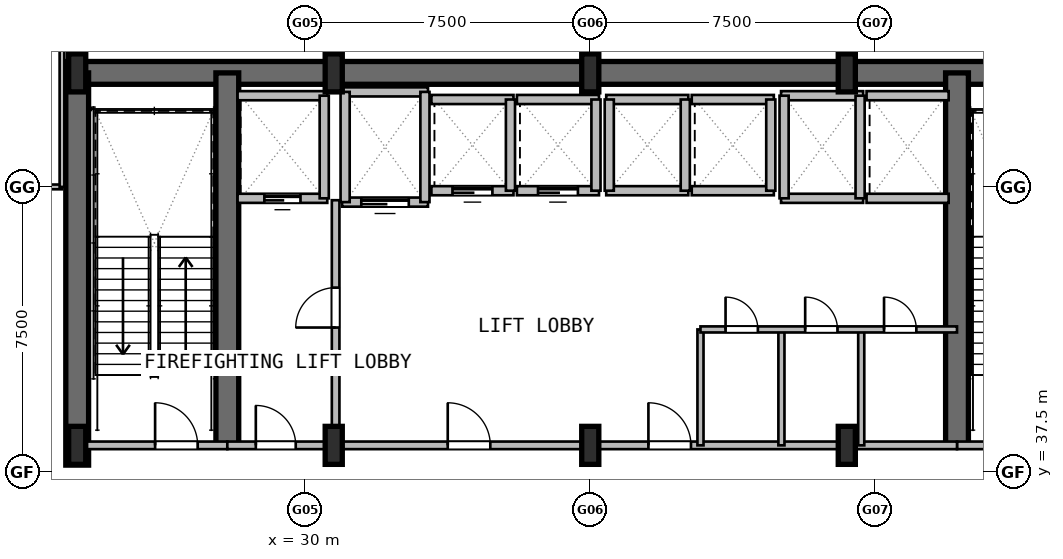
"""IFC4 building model, lengths in metres.
Left out: names, types, materials, properties, quantities, classifications, styles, units other than length and angle.
Written with IfcOpenShell. Run it as: python <this file> out.ifc"""

import sys

from ifc_helpers import new_model, si_unit, direction, frame, frame_2d, origin, origin_2d, place, context, subcontext, project, spatial, rectangle, i_section, extrude, element, fill, save


model = new_model("IFC4")
c1 = context("Model", 3, precision=1e-05, world=origin(), true_north=direction((0.0, 1.0)))
c2 = subcontext(c1, "Body", "Model", "MODEL_VIEW")
j1 = project(units=[si_unit("LENGTHUNIT", "METRE"), si_unit("PLANEANGLEUNIT", "RADIAN")], contexts=[c1])
p1 = place(None, origin())
s1 = spatial("IfcSite", under=j1, at=p1, CompositionType="ELEMENT")
p2 = place(p1, origin())
s2 = spatial("IfcBuilding", under=s1, at=p2, CompositionType="ELEMENT")
p3 = place(p2, frame((0.0, 0.0, 15.6)))
s3 = spatial("IfcBuildingStorey", under=s2, at=p3, CompositionType="ELEMENT", Elevation=15.6)
p4 = place(p3, frame((23.7, 48.0, 0.0), z_axis=(0.0, 0.0, 1.0), x_axis=(1.0, 0.0, 0.0)))
e1 = element("IfcWall", 1, at=p4, inside=s3, PredefinedType="SHEAR", context=c2, shape_type="SweptSolid", body=[
    extrude(rectangle(XDim=27.6, YDim=0.6, at=frame_2d((13.8, 0.0))), origin(), (0.0, 0.0, 1.0), 4.8),
])
p5 = place(p3, frame((24.0, 37.68, 0.0), z_axis=(0.0, 0.0, 1.0), x_axis=(0.0, 1.0, 0.0)))
e2 = element("IfcWall", 2, at=p5, inside=s3, PredefinedType="SHEAR", context=c2, shape_type="SweptSolid", body=[
    extrude(rectangle(XDim=10.32, YDim=0.6, at=frame_2d((5.16, 0.0))), origin(), (0.0, 0.0, 1.0), 4.8),
])
for number, where, z_axis, x_axis in (
    (3, (27.95, 38.2, 0.0), (0.0, 0.0, 1.0), (0.0, 1.0, 0.0)),
    (4, (47.15, 38.2, 0.0), (0.0, 0.0, 1.0), (0.0, 1.0, 0.0)),
):
    element("IfcWall", number, at=place(p3, frame(where, z_axis=z_axis, x_axis=x_axis)), inside=s3, PredefinedType="SHEAR", context=c2, shape_type="SweptSolid", body=[
        extrude(rectangle(XDim=9.8, YDim=0.6, at=frame_2d((4.9, 0.0))), origin(), (0.0, 0.0, 1.0), 4.8),
    ])
for number, where, z_axis, x_axis in (
    (5, (24.0, 38.2, 0.0), (0.0, 0.0, 1.0), (1.0, 0.0, 0.0)),
    (6, (24.0, 48.0, 0.0), (0.0, 0.0, 1.0), (1.0, 0.0, 0.0)),
    (7, (30.75, 38.2, 0.0), (0.0, 0.0, 1.0), (1.0, 0.0, 0.0)),
    (8, (30.75, 48.0, 0.0), (0.0, 0.0, 1.0), (1.0, 0.0, 0.0)),
    (9, (37.5, 38.2, 0.0), (0.0, 0.0, 1.0), (1.0, 0.0, 0.0)),
    (10, (37.5, 48.0, 0.0), (0.0, 0.0, 1.0), (1.0, 0.0, 0.0)),
    (11, (44.25, 38.2, 0.0), (0.0, 0.0, 1.0), (1.0, 0.0, 0.0)),
    (12, (44.25, 48.0, 0.0), (0.0, 0.0, 1.0), (1.0, 0.0, 0.0)),
):
    element("IfcColumn", number, at=place(p3, frame(where, z_axis=z_axis, x_axis=x_axis)), inside=s3, PredefinedType="COLUMN", context=c2, shape_type="SweptSolid", body=[
        extrude(i_section(OverallWidth=0.45, OverallDepth=1.0, WebThickness=0.022, FlangeThickness=0.04, at=origin_2d()), origin(), (0.0, 0.0, 1.0), 4.8),
    ])
p6 = place(p3, frame((24.0, 38.2, 0.0), z_axis=(0.0, 0.0, 1.0), x_axis=(1.0, 0.0, 0.0)))
e13 = element("IfcWall", 13, at=p6, inside=s3, PredefinedType="PARTITIONING", context=c2, shape_type="SweptSolid", body=[
    extrude(rectangle(XDim=3.95, YDim=0.2, at=frame_2d((1.975, 0.0))), origin(), (0.0, 0.0, 1.0), 3.68),
])
p7 = place(p6, frame((2.05, 0.0, 0.0)))
e14 = element("IfcOpeningElement", 14, at=p7, cuts=e13, PredefinedType="OPENING", context=c2, shape_type="SweptSolid", body=[
    extrude(rectangle(XDim=1.12, YDim=2.1, at=frame_2d((0.56, 1.05))), frame((0.0, 0.11, 0.0), z_axis=(0.0, -1.0, 0.0), x_axis=(1.0, 0.0, 0.0)), (0.0, 0.0, 1.0), 0.22),
])
p8 = place(p3, frame((47.15, 38.2, 0.0), z_axis=(0.0, 0.0, 1.0), x_axis=(1.0, 0.0, 0.0)))
e15 = element("IfcWall", 15, at=p8, inside=s3, PredefinedType="PARTITIONING", context=c2, shape_type="SweptSolid", body=[
    extrude(rectangle(XDim=3.85, YDim=0.2, at=frame_2d((1.925, 0.0))), origin(), (0.0, 0.0, 1.0), 3.68),
])
p9 = place(p8, frame((0.75, 0.0, 0.0)))
e16 = element("IfcOpeningElement", 16, at=p9, cuts=e15, PredefinedType="OPENING", context=c2, shape_type="SweptSolid", body=[
    extrude(rectangle(XDim=1.12, YDim=2.1, at=frame_2d((0.56, 1.05))), frame((0.0, 0.11, 0.0), z_axis=(0.0, -1.0, 0.0), x_axis=(1.0, 0.0, 0.0)), (0.0, 0.0, 1.0), 0.22),
])
p10 = place(p3, frame((30.8, 38.2, 0.0), z_axis=(0.0, 0.0, 1.0), x_axis=(0.0, 1.0, 0.0)))
e17 = element("IfcWall", 17, at=p10, inside=s3, PredefinedType="PARTITIONING", context=c2, shape_type="SweptSolid", body=[
    extrude(rectangle(XDim=6.45, YDim=0.2, at=frame_2d((3.225, 0.0))), origin(), (0.0, 0.0, 1.0), 3.68),
])
p11 = place(p10, frame((3.1, 0.0, 0.0)))
e18 = element("IfcOpeningElement", 18, at=p11, cuts=e17, PredefinedType="OPENING", context=c2, shape_type="SweptSolid", body=[
    extrude(rectangle(XDim=1.05, YDim=2.1, at=frame_2d((0.525, 1.05))), frame((0.0, 0.11, 0.0), z_axis=(0.0, -1.0, 0.0), x_axis=(1.0, 0.0, 0.0)), (0.0, 0.0, 1.0), 0.22),
])
p12 = place(p3, frame((27.95, 38.2, 0.0), z_axis=(0.0, 0.0, 1.0), x_axis=(1.0, 0.0, 0.0)))
e19 = element("IfcWall", 19, at=p12, inside=s3, PredefinedType="PARTITIONING", context=c2, shape_type="SweptSolid", body=[
    extrude(rectangle(XDim=2.85, YDim=0.2, at=frame_2d((1.425, 0.0))), origin(), (0.0, 0.0, 1.0), 3.68),
])
p13 = place(p12, frame((0.75, 0.0, 0.0)))
e20 = element("IfcOpeningElement", 20, at=p13, cuts=e19, PredefinedType="OPENING", context=c2, shape_type="SweptSolid", body=[
    extrude(rectangle(XDim=1.05, YDim=2.1, at=frame_2d((0.525, 1.05))), frame((0.0, 0.11, 0.0), z_axis=(0.0, -1.0, 0.0), x_axis=(1.0, 0.0, 0.0)), (0.0, 0.0, 1.0), 0.22),
])
p14 = place(p3, frame((30.8, 38.2, 0.0), z_axis=(0.0, 0.0, 1.0), x_axis=(1.0, 0.0, 0.0)))
e21 = element("IfcWall", 21, at=p14, inside=s3, PredefinedType="PARTITIONING", context=c2, shape_type="SweptSolid", body=[
    extrude(rectangle(XDim=16.35, YDim=0.2, at=frame_2d((8.175, 0.0))), origin(), (0.0, 0.0, 1.0), 3.68),
])
p15 = place(p14, frame((2.95, 0.0, 0.0)))
e22 = element("IfcOpeningElement", 22, at=p15, cuts=e21, PredefinedType="OPENING", context=c2, shape_type="SweptSolid", body=[
    extrude(rectangle(XDim=1.12, YDim=2.1, at=frame_2d((0.56, 1.05))), frame((0.0, 0.11, 0.0), z_axis=(0.0, -1.0, 0.0), x_axis=(1.0, 0.0, 0.0)), (0.0, 0.0, 1.0), 0.22),
])
p16 = place(p14, frame((8.23, 0.0, 0.0)))
e23 = element("IfcOpeningElement", 23, at=p16, cuts=e21, PredefinedType="OPENING", context=c2, shape_type="SweptSolid", body=[
    extrude(rectangle(XDim=1.12, YDim=2.1, at=frame_2d((0.56, 1.05))), frame((0.0, 0.11, 0.0), z_axis=(0.0, -1.0, 0.0), x_axis=(1.0, 0.0, 0.0)), (0.0, 0.0, 1.0), 0.22),
])
p17 = place(p3, frame((28.22, 44.7, 0.0), z_axis=(0.0, 0.0, 1.0), x_axis=(1.0, 0.0, 0.0)))
e24 = element("IfcWall", 24, at=p17, inside=s3, PredefinedType="PARTITIONING", context=c2, shape_type="SweptSolid", body=[
    extrude(rectangle(XDim=2.36, YDim=0.24, at=frame_2d((1.18, 0.0))), origin(), (0.0, 0.0, 1.0), 4.48),
])
p18 = place(p17, frame((0.705, 0.0, 0.0)))
e25 = element("IfcOpeningElement", 25, at=p18, cuts=e24, PredefinedType="OPENING", context=c2, shape_type="SweptSolid", body=[
    extrude(rectangle(XDim=0.95, YDim=2.15, at=frame_2d((0.475, 1.075))), frame((0.0, 0.13, 0.0), z_axis=(0.0, -1.0, 0.0), x_axis=(1.0, 0.0, 0.0)), (0.0, 0.0, 1.0), 0.26),
])
p19 = place(p3, frame((28.22, 47.4, 0.0), z_axis=(0.0, 0.0, 1.0), x_axis=(1.0, 0.0, 0.0)))
e26 = element("IfcWall", 26, at=p19, inside=s3, PredefinedType="PARTITIONING", context=c2, shape_type="SweptSolid", body=[
    extrude(rectangle(XDim=2.36, YDim=0.24, at=frame_2d((1.18, 0.0))), origin(), (0.0, 0.0, 1.0), 4.48),
])
p20 = place(p3, frame((30.5, 44.7, 0.0), z_axis=(0.0, 0.0, 1.0), x_axis=(0.0, 1.0, 0.0)))
e27 = element("IfcWall", 27, at=p20, inside=s3, PredefinedType="PARTITIONING", context=c2, shape_type="SweptSolid", body=[
    extrude(rectangle(XDim=2.7, YDim=0.24, at=frame_2d((1.35, 0.0))), origin(), (0.0, 0.0, 1.0), 3.68),
])
p21 = place(p3, frame((30.97, 44.6, 0.0), z_axis=(0.0, 0.0, 1.0), x_axis=(1.0, 0.0, 0.0)))
e28 = element("IfcWall", 28, at=p21, inside=s3, PredefinedType="PARTITIONING", context=c2, shape_type="SweptSolid", body=[
    extrude(rectangle(XDim=2.26, YDim=0.24, at=frame_2d((1.13, 0.0))), origin(), (0.0, 0.0, 1.0), 4.48),
])
p22 = place(p21, frame((0.505, 0.0, 0.0)))
e29 = element("IfcOpeningElement", 29, at=p22, cuts=e28, PredefinedType="OPENING", context=c2, shape_type="SweptSolid", body=[
    extrude(rectangle(XDim=1.25, YDim=2.2, at=frame_2d((0.625, 1.1))), frame((0.0, 0.13, 0.0), z_axis=(0.0, -1.0, 0.0), x_axis=(1.0, 0.0, 0.0)), (0.0, 0.0, 1.0), 0.26),
])
p23 = place(p3, frame((30.97, 47.5, 0.0), z_axis=(0.0, 0.0, 1.0), x_axis=(1.0, 0.0, 0.0)))
e30 = element("IfcWall", 30, at=p23, inside=s3, PredefinedType="PARTITIONING", context=c2, shape_type="SweptSolid", body=[
    extrude(rectangle(XDim=2.26, YDim=0.24, at=frame_2d((1.13, 0.0))), origin(), (0.0, 0.0, 1.0), 4.48),
])
p24 = place(p3, frame((31.05, 44.6, 0.0), z_axis=(0.0, 0.0, 1.0), x_axis=(0.0, 1.0, 0.0)))
e31 = element("IfcWall", 31, at=p24, inside=s3, PredefinedType="PARTITIONING", context=c2, shape_type="SweptSolid", body=[
    extrude(rectangle(XDim=2.9, YDim=0.24, at=frame_2d((1.45, 0.0))), origin(), (0.0, 0.0, 1.0), 3.68),
])
p25 = place(p3, frame((33.15, 44.6, 0.0), z_axis=(0.0, 0.0, 1.0), x_axis=(0.0, 1.0, 0.0)))
e32 = element("IfcWall", 32, at=p25, inside=s3, PredefinedType="PARTITIONING", context=c2, shape_type="SweptSolid", body=[
    extrude(rectangle(XDim=2.9, YDim=0.24, at=frame_2d((1.45, 0.0))), origin(), (0.0, 0.0, 1.0), 4.48),
])
p26 = place(p3, frame((33.32, 44.9, 0.0), z_axis=(0.0, 0.0, 1.0), x_axis=(1.0, 0.0, 0.0)))
e33 = element("IfcWall", 33, at=p26, inside=s3, PredefinedType="PARTITIONING", context=c2, shape_type="SweptSolid", body=[
    extrude(rectangle(XDim=2.16, YDim=0.24, at=frame_2d((1.08, 0.0))), origin(), (0.0, 0.0, 1.0), 4.48),
])
p27 = place(p26, frame((0.555, 0.0, 0.0)))
e34 = element("IfcOpeningElement", 34, at=p27, cuts=e33, PredefinedType="OPENING", context=c2, shape_type="SweptSolid", body=[
    extrude(rectangle(XDim=1.05, YDim=2.15, at=frame_2d((0.525, 1.075))), frame((0.0, 0.13, 0.0), z_axis=(0.0, -1.0, 0.0), x_axis=(1.0, 0.0, 0.0)), (0.0, 0.0, 1.0), 0.26),
])
p28 = place(p3, frame((33.32, 47.3, 0.0), z_axis=(0.0, 0.0, 1.0), x_axis=(1.0, 0.0, 0.0)))
e35 = element("IfcWall", 35, at=p28, inside=s3, PredefinedType="PARTITIONING", context=c2, shape_type="SweptSolid", body=[
    extrude(rectangle(XDim=2.16, YDim=0.24, at=frame_2d((1.08, 0.0))), origin(), (0.0, 0.0, 1.0), 4.48),
])
p29 = place(p3, frame((35.4, 44.9, 0.0), z_axis=(0.0, 0.0, 1.0), x_axis=(0.0, 1.0, 0.0)))
e36 = element("IfcWall", 36, at=p29, inside=s3, PredefinedType="PARTITIONING", context=c2, shape_type="SweptSolid", body=[
    extrude(rectangle(XDim=2.4, YDim=0.24, at=frame_2d((1.2, 0.0))), origin(), (0.0, 0.0, 1.0), 4.48),
])
p30 = place(p3, frame((35.57, 44.9, 0.0), z_axis=(0.0, 0.0, 1.0), x_axis=(1.0, 0.0, 0.0)))
e37 = element("IfcWall", 37, at=p30, inside=s3, PredefinedType="PARTITIONING", context=c2, shape_type="SweptSolid", body=[
    extrude(rectangle(XDim=2.16, YDim=0.24, at=frame_2d((1.08, 0.0))), origin(), (0.0, 0.0, 1.0), 4.48),
])
p31 = place(p30, frame((0.555, 0.0, 0.0)))
e38 = element("IfcOpeningElement", 38, at=p31, cuts=e37, PredefinedType="OPENING", context=c2, shape_type="SweptSolid", body=[
    extrude(rectangle(XDim=1.05, YDim=2.15, at=frame_2d((0.525, 1.075))), frame((0.0, 0.13, 0.0), z_axis=(0.0, -1.0, 0.0), x_axis=(1.0, 0.0, 0.0)), (0.0, 0.0, 1.0), 0.26),
])
p32 = place(p3, frame((35.57, 47.3, 0.0), z_axis=(0.0, 0.0, 1.0), x_axis=(1.0, 0.0, 0.0)))
e39 = element("IfcWall", 39, at=p32, inside=s3, PredefinedType="PARTITIONING", context=c2, shape_type="SweptSolid", body=[
    extrude(rectangle(XDim=2.16, YDim=0.24, at=frame_2d((1.08, 0.0))), origin(), (0.0, 0.0, 1.0), 4.48),
])
p33 = place(p3, frame((37.65, 44.9, 0.0), z_axis=(0.0, 0.0, 1.0), x_axis=(0.0, 1.0, 0.0)))
e40 = element("IfcWall", 40, at=p33, inside=s3, PredefinedType="PARTITIONING", context=c2, shape_type="SweptSolid", body=[
    extrude(rectangle(XDim=2.4, YDim=0.24, at=frame_2d((1.2, 0.0))), origin(), (0.0, 0.0, 1.0), 4.48),
])
for number, where, z_axis, x_axis in (
    (41, (37.92, 44.9, 0.0), (0.0, 0.0, 1.0), (1.0, 0.0, 0.0)),
    (42, (37.92, 47.3, 0.0), (0.0, 0.0, 1.0), (1.0, 0.0, 0.0)),
):
    element("IfcWall", number, at=place(p3, frame(where, z_axis=z_axis, x_axis=x_axis)), inside=s3, PredefinedType="PARTITIONING", context=c2, shape_type="SweptSolid", body=[
        extrude(rectangle(XDim=2.16, YDim=0.24, at=frame_2d((1.08, 0.0))), origin(), (0.0, 0.0, 1.0), 4.48),
    ])
for number, where, z_axis, x_axis in (
    (43, (38.0, 44.9, 0.0), (0.0, 0.0, 1.0), (0.0, 1.0, 0.0)),
    (44, (40.0, 44.9, 0.0), (0.0, 0.0, 1.0), (0.0, 1.0, 0.0)),
):
    element("IfcWall", number, at=place(p3, frame(where, z_axis=z_axis, x_axis=x_axis)), inside=s3, PredefinedType="PARTITIONING", context=c2, shape_type="SweptSolid", body=[
        extrude(rectangle(XDim=2.4, YDim=0.24, at=frame_2d((1.2, 0.0))), origin(), (0.0, 0.0, 1.0), 4.48),
    ])
for number, where, z_axis, x_axis in (
    (45, (40.17, 44.9, 0.0), (0.0, 0.0, 1.0), (1.0, 0.0, 0.0)),
    (46, (40.17, 47.3, 0.0), (0.0, 0.0, 1.0), (1.0, 0.0, 0.0)),
):
    element("IfcWall", number, at=place(p3, frame(where, z_axis=z_axis, x_axis=x_axis)), inside=s3, PredefinedType="PARTITIONING", context=c2, shape_type="SweptSolid", body=[
        extrude(rectangle(XDim=2.16, YDim=0.24, at=frame_2d((1.08, 0.0))), origin(), (0.0, 0.0, 1.0), 4.48),
    ])
p34 = place(p3, frame((42.25, 44.9, 0.0), z_axis=(0.0, 0.0, 1.0), x_axis=(0.0, 1.0, 0.0)))
e47 = element("IfcWall", 47, at=p34, inside=s3, PredefinedType="PARTITIONING", context=c2, shape_type="SweptSolid", body=[
    extrude(rectangle(XDim=2.4, YDim=0.24, at=frame_2d((1.2, 0.0))), origin(), (0.0, 0.0, 1.0), 4.48),
])
for number, where, z_axis, x_axis in (
    (48, (42.52, 44.7, 0.0), (0.0, 0.0, 1.0), (1.0, 0.0, 0.0)),
    (49, (42.52, 47.4, 0.0), (0.0, 0.0, 1.0), (1.0, 0.0, 0.0)),
):
    element("IfcWall", number, at=place(p3, frame(where, z_axis=z_axis, x_axis=x_axis)), inside=s3, PredefinedType="PARTITIONING", context=c2, shape_type="SweptSolid", body=[
        extrude(rectangle(XDim=2.16, YDim=0.24, at=frame_2d((1.08, 0.0))), origin(), (0.0, 0.0, 1.0), 4.48),
    ])
for number, where, z_axis, x_axis in (
    (50, (42.6, 44.7, 0.0), (0.0, 0.0, 1.0), (0.0, 1.0, 0.0)),
    (51, (44.6, 44.7, 0.0), (0.0, 0.0, 1.0), (0.0, 1.0, 0.0)),
):
    element("IfcWall", number, at=place(p3, frame(where, z_axis=z_axis, x_axis=x_axis)), inside=s3, PredefinedType="PARTITIONING", context=c2, shape_type="SweptSolid", body=[
        extrude(rectangle(XDim=2.7, YDim=0.24, at=frame_2d((1.35, 0.0))), origin(), (0.0, 0.0, 1.0), 4.48),
    ])
for number, where, z_axis, x_axis in (
    (52, (44.77, 44.7, 0.0), (0.0, 0.0, 1.0), (1.0, 0.0, 0.0)),
    (53, (44.77, 47.4, 0.0), (0.0, 0.0, 1.0), (1.0, 0.0, 0.0)),
):
    element("IfcWall", number, at=place(p3, frame(where, z_axis=z_axis, x_axis=x_axis)), inside=s3, PredefinedType="PARTITIONING", context=c2, shape_type="SweptSolid", body=[
        extrude(rectangle(XDim=2.16, YDim=0.24, at=frame_2d((1.08, 0.0))), origin(), (0.0, 0.0, 1.0), 4.48),
    ])
p35 = place(p3, frame((19.0, 45.0, 0.0), z_axis=(0.0, 0.0, 1.0), x_axis=(1.0, 0.0, 0.0)))
e54 = element("IfcWall", 54, at=p35, inside=s3, PredefinedType="PARTITIONING", context=c2, shape_type="SweptSolid", body=[
    extrude(rectangle(XDim=4.6, YDim=0.125, at=frame_2d((2.3, 0.0))), origin(), (0.0, 0.0, 1.0), 4.48),
])
p36 = place(p35, frame((1.5, 0.0, 0.0)))
e55 = element("IfcOpeningElement", 55, at=p36, cuts=e54, PredefinedType="OPENING", context=c2, shape_type="SweptSolid", body=[
    extrude(rectangle(XDim=0.9, YDim=2.05, at=frame_2d((0.45, 1.025))), frame((0.0, 0.073, 0.0), z_axis=(0.0, -1.0, 0.0), x_axis=(1.0, 0.0, 0.0)), (0.0, 0.0, 1.0), 0.145),
])
p37 = place(p3, frame((23.6, 45.0, 0.0), z_axis=(0.0, 0.0, 1.0), x_axis=(0.0, 1.0, 0.0)))
e56 = element("IfcWall", 56, at=p37, inside=s3, PredefinedType="PARTITIONING", context=c2, shape_type="SweptSolid", body=[
    extrude(rectangle(XDim=4.6, YDim=0.125, at=frame_2d((2.3, 0.0))), origin(), (0.0, 0.0, 1.0), 4.48),
])
for number, where, z_axis, x_axis in (
    (57, (40.4, 38.2, 0.0), (0.0, 0.0, 1.0), (0.0, 1.0, 0.0)),
    (58, (42.53, 38.2, 0.0), (0.0, 0.0, 1.0), (0.0, 1.0, 0.0)),
    (59, (44.63, 38.2, 0.0), (0.0, 0.0, 1.0), (0.0, 1.0, 0.0)),
):
    element("IfcWall", number, at=place(p3, frame(where, z_axis=z_axis, x_axis=x_axis)), inside=s3, PredefinedType="PARTITIONING", context=c2, shape_type="SweptSolid", body=[
        extrude(rectangle(XDim=3.05, YDim=0.16, at=frame_2d((1.525, 0.0))), origin(), (0.0, 0.0, 1.0), 4.48),
    ])
p38 = place(p3, frame((40.4, 41.25, 0.0), z_axis=(0.0, 0.0, 1.0), x_axis=(1.0, 0.0, 0.0)))
e60 = element("IfcWall", 60, at=p38, inside=s3, PredefinedType="PARTITIONING", context=c2, shape_type="SweptSolid", body=[
    extrude(rectangle(XDim=6.75, YDim=0.16, at=frame_2d((3.375, 0.0))), origin(), (0.0, 0.0, 1.0), 4.48),
])
p39 = place(p38, frame((0.66, 0.0, 0.0)))
e61 = element("IfcOpeningElement", 61, at=p39, cuts=e60, PredefinedType="OPENING", context=c2, shape_type="SweptSolid", body=[
    extrude(rectangle(XDim=0.85, YDim=2.05, at=frame_2d((0.425, 1.025))), frame((0.0, 0.09, 0.0), z_axis=(0.0, -1.0, 0.0), x_axis=(1.0, 0.0, 0.0)), (0.0, 0.0, 1.0), 0.18),
])
p40 = place(p38, frame((2.755, 0.0, 0.0)))
e62 = element("IfcOpeningElement", 62, at=p40, cuts=e60, PredefinedType="OPENING", context=c2, shape_type="SweptSolid", body=[
    extrude(rectangle(XDim=0.85, YDim=2.05, at=frame_2d((0.425, 1.025))), frame((0.0, 0.09, 0.0), z_axis=(0.0, -1.0, 0.0), x_axis=(1.0, 0.0, 0.0)), (0.0, 0.0, 1.0), 0.18),
])
p41 = place(p38, frame((4.83, 0.0, 0.0)))
e63 = element("IfcOpeningElement", 63, at=p41, cuts=e60, PredefinedType="OPENING", context=c2, shape_type="SweptSolid", body=[
    extrude(rectangle(XDim=0.85, YDim=2.05, at=frame_2d((0.425, 1.025))), frame((0.0, 0.09, 0.0), z_axis=(0.0, -1.0, 0.0), x_axis=(1.0, 0.0, 0.0)), (0.0, 0.0, 1.0), 0.18),
])
p42 = place(p7, origin())
e64 = element("IfcDoor", 64, at=p42, inside=s3, OperationType="SINGLE_SWING_LEFT", PredefinedType="DOOR", context=c2, shape_type="SweptSolid", body=[
    extrude(rectangle(XDim=1.12, YDim=2.1, at=frame_2d((0.56, 1.05))), frame((0.0, 0.025, 0.0), z_axis=(0.0, -1.0, 0.0), x_axis=(1.0, 0.0, 0.0)), (0.0, 0.0, 1.0), 0.05),
])
fill(e14, e64)
p43 = place(p11, origin())
e65 = element("IfcDoor", 65, at=p43, inside=s3, OperationType="SINGLE_SWING_LEFT", PredefinedType="DOOR", context=c2, shape_type="SweptSolid", body=[
    extrude(rectangle(XDim=1.05, YDim=2.1, at=frame_2d((0.525, 1.05))), frame((0.0, 0.025, 0.0), z_axis=(0.0, -1.0, 0.0), x_axis=(1.0, 0.0, 0.0)), (0.0, 0.0, 1.0), 0.05),
])
fill(e18, e65)
p44 = place(p13, origin())
e66 = element("IfcDoor", 66, at=p44, inside=s3, OperationType="SINGLE_SWING_RIGHT", PredefinedType="DOOR", context=c2, shape_type="SweptSolid", body=[
    extrude(rectangle(XDim=1.05, YDim=2.1, at=frame_2d((0.525, 1.05))), frame((0.0, 0.025, 0.0), z_axis=(0.0, -1.0, 0.0), x_axis=(1.0, 0.0, 0.0)), (0.0, 0.0, 1.0), 0.05),
])
fill(e20, e66)
p45 = place(p15, origin())
e67 = element("IfcDoor", 67, at=p45, inside=s3, OperationType="SINGLE_SWING_LEFT", PredefinedType="DOOR", context=c2, shape_type="SweptSolid", body=[
    extrude(rectangle(XDim=1.12, YDim=2.1, at=frame_2d((0.56, 1.05))), frame((0.0, 0.025, 0.0), z_axis=(0.0, -1.0, 0.0), x_axis=(1.0, 0.0, 0.0)), (0.0, 0.0, 1.0), 0.05),
])
fill(e22, e67)
p46 = place(p16, origin())
e68 = element("IfcDoor", 68, at=p46, inside=s3, OperationType="SINGLE_SWING_RIGHT", PredefinedType="DOOR", context=c2, shape_type="SweptSolid", body=[
    extrude(rectangle(XDim=1.12, YDim=2.1, at=frame_2d((0.56, 1.05))), frame((0.0, 0.025, 0.0), z_axis=(0.0, -1.0, 0.0), x_axis=(1.0, 0.0, 0.0)), (0.0, 0.0, 1.0), 0.05),
])
fill(e23, e68)
p47 = place(p18, origin())
e69 = element("IfcDoor", 69, at=p47, inside=s3, OperationType="SLIDING_TO_LEFT", PredefinedType="DOOR", context=c2, shape_type="SweptSolid", body=[
    extrude(rectangle(XDim=0.95, YDim=2.15, at=frame_2d((0.475, 1.075))), frame((0.0, 0.025, 0.0), z_axis=(0.0, -1.0, 0.0), x_axis=(1.0, 0.0, 0.0)), (0.0, 0.0, 1.0), 0.05),
])
fill(e25, e69)
p48 = place(p22, origin())
e70 = element("IfcDoor", 70, at=p48, inside=s3, OperationType="SLIDING_TO_LEFT", PredefinedType="DOOR", context=c2, shape_type="SweptSolid", body=[
    extrude(rectangle(XDim=1.25, YDim=2.2, at=frame_2d((0.625, 1.1))), frame((0.0, 0.025, 0.0), z_axis=(0.0, -1.0, 0.0), x_axis=(1.0, 0.0, 0.0)), (0.0, 0.0, 1.0), 0.05),
])
fill(e29, e70)
p49 = place(p27, origin())
e71 = element("IfcDoor", 71, at=p49, inside=s3, OperationType="SLIDING_TO_LEFT", PredefinedType="DOOR", context=c2, shape_type="SweptSolid", body=[
    extrude(rectangle(XDim=1.05, YDim=2.15, at=frame_2d((0.525, 1.075))), frame((0.0, 0.025, 0.0), z_axis=(0.0, -1.0, 0.0), x_axis=(1.0, 0.0, 0.0)), (0.0, 0.0, 1.0), 0.05),
])
fill(e34, e71)
p50 = place(p31, origin())
e72 = element("IfcDoor", 72, at=p50, inside=s3, OperationType="SLIDING_TO_LEFT", PredefinedType="DOOR", context=c2, shape_type="SweptSolid", body=[
    extrude(rectangle(XDim=1.05, YDim=2.15, at=frame_2d((0.525, 1.075))), frame((0.0, 0.025, 0.0), z_axis=(0.0, -1.0, 0.0), x_axis=(1.0, 0.0, 0.0)), (0.0, 0.0, 1.0), 0.05),
])
fill(e38, e72)
p51 = place(p39, origin())
e73 = element("IfcDoor", 73, at=p51, inside=s3, OperationType="SINGLE_SWING_LEFT", PredefinedType="DOOR", context=c2, shape_type="SweptSolid", body=[
    extrude(rectangle(XDim=0.85, YDim=2.05, at=frame_2d((0.425, 1.025))), frame((0.0, 0.025, 0.0), z_axis=(0.0, -1.0, 0.0), x_axis=(1.0, 0.0, 0.0)), (0.0, 0.0, 1.0), 0.05),
])
fill(e61, e73)
p52 = place(p40, origin())
e74 = element("IfcDoor", 74, at=p52, inside=s3, OperationType="SINGLE_SWING_RIGHT", PredefinedType="DOOR", context=c2, shape_type="SweptSolid", body=[
    extrude(rectangle(XDim=0.85, YDim=2.05, at=frame_2d((0.425, 1.025))), frame((0.0, 0.025, 0.0), z_axis=(0.0, -1.0, 0.0), x_axis=(1.0, 0.0, 0.0)), (0.0, 0.0, 1.0), 0.05),
])
fill(e62, e74)
p53 = place(p41, origin())
e75 = element("IfcDoor", 75, at=p53, inside=s3, OperationType="SINGLE_SWING_LEFT", PredefinedType="DOOR", context=c2, shape_type="SweptSolid", body=[
    extrude(rectangle(XDim=0.85, YDim=2.05, at=frame_2d((0.425, 1.025))), frame((0.0, 0.025, 0.0), z_axis=(0.0, -1.0, 0.0), x_axis=(1.0, 0.0, 0.0)), (0.0, 0.0, 1.0), 0.05),
])
fill(e63, e75)
save(model, sys.argv[1])
